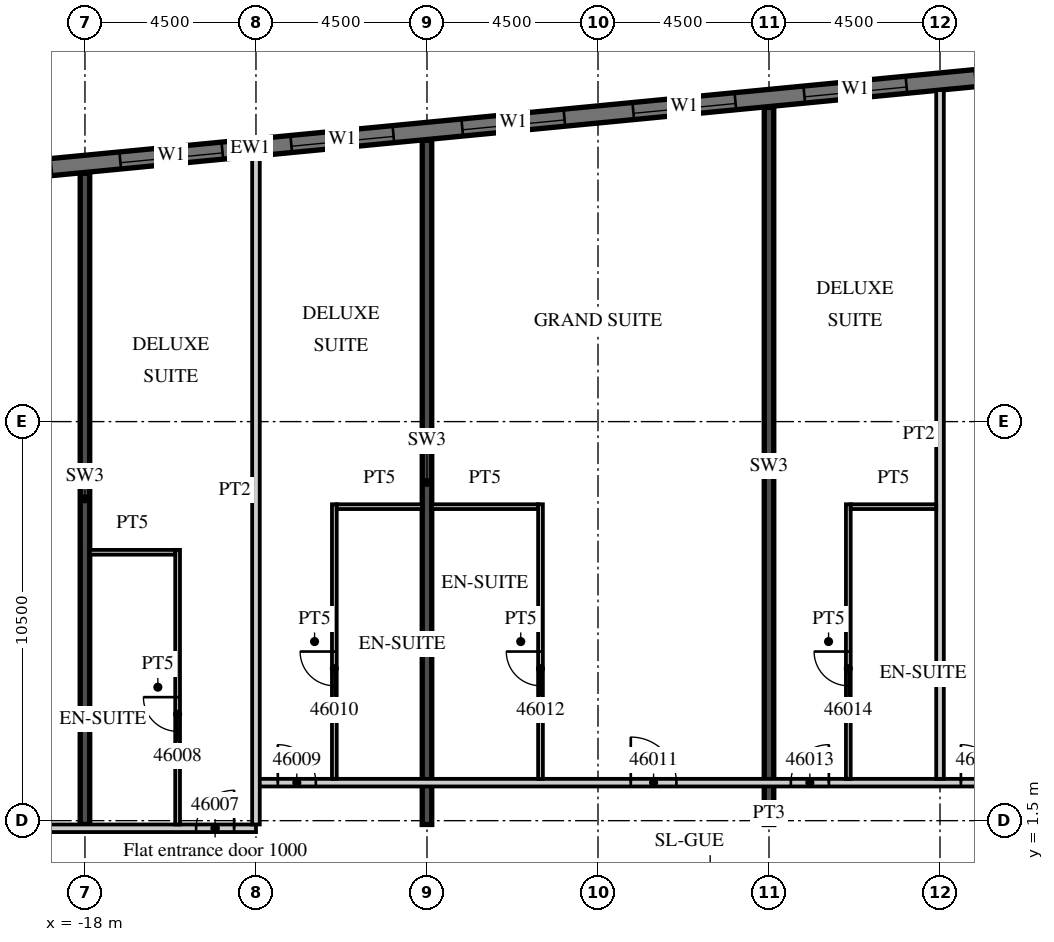
"""IFC4 building model, lengths in metres.
Left out: names, types, materials, properties, quantities, classifications, styles, units other than length and angle.
Written with IfcOpenShell. Run it as: python <this file> out.ifc"""

import sys

from ifc_helpers import new_model, si_unit, direction, frame, frame_2d, origin, place, context, subcontext, project, spatial, rectangle, extrude, element, fill, save


model = new_model("IFC4")
c1 = context("Model", 3, precision=1e-05, world=origin(), true_north=direction((0.0, 1.0)))
c2 = subcontext(c1, "Body", "Model", "MODEL_VIEW")
j1 = project(units=[si_unit("LENGTHUNIT", "METRE"), si_unit("PLANEANGLEUNIT", "RADIAN")], contexts=[c1])
p1 = place(None, origin())
s1 = spatial("IfcSite", under=j1, at=p1, CompositionType="ELEMENT")
p2 = place(p1, origin())
s2 = spatial("IfcBuilding", under=s1, at=p2, CompositionType="ELEMENT")
p3 = place(p2, frame((0.0, 0.0, 193.3)))
s3 = spatial("IfcBuildingStorey", under=s2, at=p3, CompositionType="ELEMENT", Elevation=193.3)
p4 = place(p3, frame((-18.0, 1.4, 0.0), z_axis=(0.0, 0.0, 1.0), x_axis=(0.0, 1.0, 0.0)))
e1 = element("IfcWall", 1, at=p4, inside=s3, PredefinedType="SHEAR", context=c2, shape_type="SweptSolid", body=[
    extrude(rectangle(XDim=17.134, YDim=0.25, at=frame_2d((8.567, 0.0))), origin(), (0.0, 0.0, 1.0), 3.3),
])
p5 = place(p3, frame((-9.0, 1.4, 0.0), z_axis=(0.0, 0.0, 1.0), x_axis=(0.0, 1.0, 0.0)))
e2 = element("IfcWall", 2, at=p5, inside=s3, PredefinedType="SHEAR", context=c2, shape_type="SweptSolid", body=[
    extrude(rectangle(XDim=18.001, YDim=0.25, at=frame_2d((9.0, 0.0))), origin(), (0.0, 0.0, 1.0), 3.3),
])
p6 = place(p3, frame((0.0, 1.4, 0.0), z_axis=(0.0, 0.0, 1.0), x_axis=(0.0, 1.0, 0.0)))
e3 = element("IfcWall", 3, at=p6, inside=s3, PredefinedType="SHEAR", context=c2, shape_type="SweptSolid", body=[
    extrude(rectangle(XDim=18.867, YDim=0.25, at=frame_2d((9.434, 0.0))), origin(), (0.0, 0.0, 1.0), 3.3),
])
p7 = place(p3, frame((13.521, 21.817, 0.0), z_axis=(0.0, 0.0, 1.0), x_axis=(-0.995396508751, -0.095842529008, 0.0)))
e4 = element("IfcWall", 4, at=p7, inside=s3, PredefinedType="SOLIDWALL", context=c2, shape_type="SweptSolid", body=[
    extrude(rectangle(XDim=54.591, YDim=0.45, at=frame_2d((27.296, 0.0))), origin(), (0.0, 0.0, 1.0), 3.02),
])
p8 = place(p7, frame((0.91, 0.0, 0.45)))
e5 = element("IfcOpeningElement", 5, at=p8, cuts=e4, PredefinedType="OPENING", context=c2, shape_type="SweptSolid", body=[
    extrude(rectangle(XDim=2.7, YDim=2.25, at=frame_2d((1.35, 1.125))), frame((0.0, 0.235, 0.0), z_axis=(0.0, -1.0, 0.0), x_axis=(1.0, 0.0, 0.0)), (0.0, 0.0, 1.0), 0.47),
])
p9 = place(p7, frame((5.431, 0.0, 0.45)))
e6 = element("IfcOpeningElement", 6, at=p9, cuts=e4, PredefinedType="OPENING", context=c2, shape_type="SweptSolid", body=[
    extrude(rectangle(XDim=2.7, YDim=2.25, at=frame_2d((1.35, 1.125))), frame((0.0, 0.235, 0.0), z_axis=(0.0, -1.0, 0.0), x_axis=(1.0, 0.0, 0.0)), (0.0, 0.0, 1.0), 0.47),
])
p10 = place(p7, frame((9.952, 0.0, 0.45)))
e7 = element("IfcOpeningElement", 7, at=p10, cuts=e4, PredefinedType="OPENING", context=c2, shape_type="SweptSolid", body=[
    extrude(rectangle(XDim=2.7, YDim=2.25, at=frame_2d((1.35, 1.125))), frame((0.0, 0.235, 0.0), z_axis=(0.0, -1.0, 0.0), x_axis=(1.0, 0.0, 0.0)), (0.0, 0.0, 1.0), 0.47),
])
p11 = place(p7, frame((14.473, 0.0, 0.45)))
e8 = element("IfcOpeningElement", 8, at=p11, cuts=e4, PredefinedType="OPENING", context=c2, shape_type="SweptSolid", body=[
    extrude(rectangle(XDim=2.7, YDim=2.25, at=frame_2d((1.35, 1.125))), frame((0.0, 0.235, 0.0), z_axis=(0.0, -1.0, 0.0), x_axis=(1.0, 0.0, 0.0)), (0.0, 0.0, 1.0), 0.47),
])
p12 = place(p7, frame((18.994, 0.0, 0.45)))
e9 = element("IfcOpeningElement", 9, at=p12, cuts=e4, PredefinedType="OPENING", context=c2, shape_type="SweptSolid", body=[
    extrude(rectangle(XDim=2.7, YDim=2.25, at=frame_2d((1.35, 1.125))), frame((0.0, 0.235, 0.0), z_axis=(0.0, -1.0, 0.0), x_axis=(1.0, 0.0, 0.0)), (0.0, 0.0, 1.0), 0.47),
])
p13 = place(p7, frame((23.514, 0.0, 0.45)))
e10 = element("IfcOpeningElement", 10, at=p13, cuts=e4, PredefinedType="OPENING", context=c2, shape_type="SweptSolid", body=[
    extrude(rectangle(XDim=2.7, YDim=2.25, at=frame_2d((1.35, 1.125))), frame((0.0, 0.235, 0.0), z_axis=(0.0, -1.0, 0.0), x_axis=(1.0, 0.0, 0.0)), (0.0, 0.0, 1.0), 0.47),
])
p14 = place(p7, frame((28.035, 0.0, 0.45)))
e11 = element("IfcOpeningElement", 11, at=p14, cuts=e4, PredefinedType="OPENING", context=c2, shape_type="SweptSolid", body=[
    extrude(rectangle(XDim=2.7, YDim=2.25, at=frame_2d((1.35, 1.125))), frame((0.0, 0.235, 0.0), z_axis=(0.0, -1.0, 0.0), x_axis=(1.0, 0.0, 0.0)), (0.0, 0.0, 1.0), 0.47),
])
p15 = place(p7, frame((32.556, 0.0, 0.45)))
e12 = element("IfcOpeningElement", 12, at=p15, cuts=e4, PredefinedType="OPENING", context=c2, shape_type="SweptSolid", body=[
    extrude(rectangle(XDim=2.7, YDim=2.25, at=frame_2d((1.35, 1.125))), frame((0.0, 0.235, 0.0), z_axis=(0.0, -1.0, 0.0), x_axis=(1.0, 0.0, 0.0)), (0.0, 0.0, 1.0), 0.47),
])
p16 = place(p7, frame((37.077, 0.0, 0.45)))
e13 = element("IfcOpeningElement", 13, at=p16, cuts=e4, PredefinedType="OPENING", context=c2, shape_type="SweptSolid", body=[
    extrude(rectangle(XDim=2.7, YDim=2.25, at=frame_2d((1.35, 1.125))), frame((0.0, 0.235, 0.0), z_axis=(0.0, -1.0, 0.0), x_axis=(1.0, 0.0, 0.0)), (0.0, 0.0, 1.0), 0.47),
])
p17 = place(p7, frame((41.598, 0.0, 0.45)))
e14 = element("IfcOpeningElement", 14, at=p17, cuts=e4, PredefinedType="OPENING", context=c2, shape_type="SweptSolid", body=[
    extrude(rectangle(XDim=2.7, YDim=2.25, at=frame_2d((1.35, 1.125))), frame((0.0, 0.235, 0.0), z_axis=(0.0, -1.0, 0.0), x_axis=(1.0, 0.0, 0.0)), (0.0, 0.0, 1.0), 0.47),
])
p18 = place(p7, frame((46.118, 0.0, 0.45)))
e15 = element("IfcOpeningElement", 15, at=p18, cuts=e4, PredefinedType="OPENING", context=c2, shape_type="SweptSolid", body=[
    extrude(rectangle(XDim=2.7, YDim=2.25, at=frame_2d((1.35, 1.125))), frame((0.0, 0.235, 0.0), z_axis=(0.0, -1.0, 0.0), x_axis=(1.0, 0.0, 0.0)), (0.0, 0.0, 1.0), 0.47),
])
p19 = place(p7, frame((50.629, 0.0, 0.45)))
e16 = element("IfcOpeningElement", 16, at=p19, cuts=e4, PredefinedType="OPENING", context=c2, shape_type="SweptSolid", body=[
    extrude(rectangle(XDim=2.7, YDim=2.25, at=frame_2d((1.35, 1.125))), frame((0.0, 0.235, 0.0), z_axis=(0.0, -1.0, 0.0), x_axis=(1.0, 0.0, 0.0)), (0.0, 0.0, 1.0), 0.47),
])
p20 = place(p3, frame((-42.913, 1.3, 0.0), z_axis=(0.0, 0.0, 1.0), x_axis=(1.0, 0.0, 0.0)))
e17 = element("IfcWall", 17, at=p20, inside=s3, PredefinedType="PARTITIONING", context=c2, shape_type="SweptSolid", body=[
    extrude(rectangle(XDim=29.413, YDim=0.2, at=frame_2d((14.707, 0.0))), origin(), (0.0, 0.0, 1.0), 3.02),
])
p21 = place(p20, frame((1.406, 0.0, 0.0)))
e18 = element("IfcOpeningElement", 18, at=p21, cuts=e17, PredefinedType="OPENING", context=c2, shape_type="SweptSolid", body=[
    extrude(rectangle(XDim=1.2, YDim=2.1, at=frame_2d((0.6, 1.05))), frame((0.0, 0.11, 0.0), z_axis=(0.0, -1.0, 0.0), x_axis=(1.0, 0.0, 0.0)), (0.0, 0.0, 1.0), 0.22),
])
p22 = place(p20, frame((12.275, 0.0, 0.0)))
e19 = element("IfcOpeningElement", 19, at=p22, cuts=e17, PredefinedType="OPENING", context=c2, shape_type="SweptSolid", body=[
    extrude(rectangle(XDim=1.2, YDim=2.1, at=frame_2d((0.6, 1.05))), frame((0.0, 0.11, 0.0), z_axis=(0.0, -1.0, 0.0), x_axis=(1.0, 0.0, 0.0)), (0.0, 0.0, 1.0), 0.22),
])
p23 = place(p20, frame((21.275, 0.0, 0.0)))
e20 = element("IfcOpeningElement", 20, at=p23, cuts=e17, PredefinedType="OPENING", context=c2, shape_type="SweptSolid", body=[
    extrude(rectangle(XDim=1.2, YDim=2.1, at=frame_2d((0.6, 1.05))), frame((0.0, 0.11, 0.0), z_axis=(0.0, -1.0, 0.0), x_axis=(1.0, 0.0, 0.0)), (0.0, 0.0, 1.0), 0.22),
])
p24 = place(p20, frame((27.838, 0.0, 0.0)))
e21 = element("IfcOpeningElement", 21, at=p24, cuts=e17, PredefinedType="OPENING", context=c2, shape_type="SweptSolid", body=[
    extrude(rectangle(XDim=1.0, YDim=2.1, at=frame_2d((0.5, 1.05))), frame((0.0, 0.11, 0.0), z_axis=(0.0, -1.0, 0.0), x_axis=(1.0, 0.0, 0.0)), (0.0, 0.0, 1.0), 0.22),
])
p25 = place(p3, frame((-13.5, 2.5, 0.0), z_axis=(0.0, 0.0, 1.0), x_axis=(1.0, 0.0, 0.0)))
e22 = element("IfcWall", 22, at=p25, inside=s3, PredefinedType="PARTITIONING", context=c2, shape_type="SweptSolid", body=[
    extrude(rectangle(XDim=27.0, YDim=0.2, at=frame_2d((13.5, 0.0))), origin(), (0.0, 0.0, 1.0), 3.02),
])
p26 = place(p25, frame((0.575, 0.0, 0.0)))
e23 = element("IfcOpeningElement", 23, at=p26, cuts=e22, PredefinedType="OPENING", context=c2, shape_type="SweptSolid", body=[
    extrude(rectangle(XDim=1.0, YDim=2.1, at=frame_2d((0.5, 1.05))), frame((0.0, 0.11, 0.0), z_axis=(0.0, -1.0, 0.0), x_axis=(1.0, 0.0, 0.0)), (0.0, 0.0, 1.0), 0.22),
])
p27 = place(p25, frame((9.863, 0.0, 0.0)))
e24 = element("IfcOpeningElement", 24, at=p27, cuts=e22, PredefinedType="OPENING", context=c2, shape_type="SweptSolid", body=[
    extrude(rectangle(XDim=1.2, YDim=2.1, at=frame_2d((0.6, 1.05))), frame((0.0, 0.11, 0.0), z_axis=(0.0, -1.0, 0.0), x_axis=(1.0, 0.0, 0.0)), (0.0, 0.0, 1.0), 0.22),
])
p28 = place(p25, frame((14.075, 0.0, 0.0)))
e25 = element("IfcOpeningElement", 25, at=p28, cuts=e22, PredefinedType="OPENING", context=c2, shape_type="SweptSolid", body=[
    extrude(rectangle(XDim=1.0, YDim=2.1, at=frame_2d((0.5, 1.05))), frame((0.0, 0.11, 0.0), z_axis=(0.0, -1.0, 0.0), x_axis=(1.0, 0.0, 0.0)), (0.0, 0.0, 1.0), 0.22),
])
p29 = place(p25, frame((18.55, 0.0, 0.0)))
e26 = element("IfcOpeningElement", 26, at=p29, cuts=e22, PredefinedType="OPENING", context=c2, shape_type="SweptSolid", body=[
    extrude(rectangle(XDim=1.0, YDim=2.1, at=frame_2d((0.5, 1.05))), frame((0.0, 0.11, 0.0), z_axis=(0.0, -1.0, 0.0), x_axis=(1.0, 0.0, 0.0)), (0.0, 0.0, 1.0), 0.22),
])
p30 = place(p25, frame((23.075, 0.0, 0.0)))
e27 = element("IfcOpeningElement", 27, at=p30, cuts=e22, PredefinedType="OPENING", context=c2, shape_type="SweptSolid", body=[
    extrude(rectangle(XDim=1.0, YDim=2.1, at=frame_2d((0.5, 1.05))), frame((0.0, 0.11, 0.0), z_axis=(0.0, -1.0, 0.0), x_axis=(1.0, 0.0, 0.0)), (0.0, 0.0, 1.0), 0.22),
])
p31 = place(p3, frame((-13.5, 1.4, 0.0), z_axis=(0.0, 0.0, 1.0), x_axis=(0.0, 1.0, 0.0)))
e28 = element("IfcWall", 28, at=p31, inside=s3, PredefinedType="PARTITIONING", context=c2, shape_type="SweptSolid", body=[
    extrude(rectangle(XDim=17.59, YDim=0.2, at=frame_2d((8.795, 0.0))), origin(), (0.0, 0.0, 1.0), 3.02),
])
p32 = place(p3, frame((-15.562, 1.4, 0.0), z_axis=(0.0, 0.0, 1.0), x_axis=(0.0, 1.0, 0.0)))
e29 = element("IfcWall", 29, at=p32, inside=s3, PredefinedType="PARTITIONING", context=c2, shape_type="SweptSolid", body=[
    extrude(rectangle(XDim=7.225, YDim=0.125, at=frame_2d((3.613, 0.0))), origin(), (0.0, 0.0, 1.0), 3.02),
])
p33 = place(p32, frame((2.45, 0.0, 0.0)))
e30 = element("IfcOpeningElement", 30, at=p33, cuts=e29, PredefinedType="OPENING", context=c2, shape_type="SweptSolid", body=[
    extrude(rectangle(XDim=0.9, YDim=2.1, at=frame_2d((0.45, 1.05))), frame((0.0, 0.073, 0.0), z_axis=(0.0, -1.0, 0.0), x_axis=(1.0, 0.0, 0.0)), (0.0, 0.0, 1.0), 0.145),
])
p34 = place(p3, frame((-17.875, 8.562, 0.0), z_axis=(0.0, 0.0, 1.0), x_axis=(1.0, 0.0, 0.0)))
e31 = element("IfcWall", 31, at=p34, inside=s3, PredefinedType="PARTITIONING", context=c2, shape_type="SweptSolid", body=[
    extrude(rectangle(XDim=2.25, YDim=0.125, at=frame_2d((1.125, 0.0))), origin(), (0.0, 0.0, 1.0), 3.02),
])
p35 = place(p3, frame((-11.438, 2.6, 0.0), z_axis=(0.0, 0.0, 1.0), x_axis=(0.0, 1.0, 0.0)))
e32 = element("IfcWall", 32, at=p35, inside=s3, PredefinedType="PARTITIONING", context=c2, shape_type="SweptSolid", body=[
    extrude(rectangle(XDim=7.225, YDim=0.125, at=frame_2d((3.612, 0.0))), origin(), (0.0, 0.0, 1.0), 3.02),
])
p36 = place(p35, frame((2.45, 0.0, 0.0)))
e33 = element("IfcOpeningElement", 33, at=p36, cuts=e32, PredefinedType="OPENING", context=c2, shape_type="SweptSolid", body=[
    extrude(rectangle(XDim=0.9, YDim=2.1, at=frame_2d((0.45, 1.05))), frame((0.0, 0.073, 0.0), z_axis=(0.0, -1.0, 0.0), x_axis=(1.0, 0.0, 0.0)), (0.0, 0.0, 1.0), 0.145),
])
p37 = place(p3, frame((-11.375, 9.762, 0.0), z_axis=(0.0, 0.0, 1.0), x_axis=(1.0, 0.0, 0.0)))
e34 = element("IfcWall", 34, at=p37, inside=s3, PredefinedType="PARTITIONING", context=c2, shape_type="SweptSolid", body=[
    extrude(rectangle(XDim=2.25, YDim=0.125, at=frame_2d((1.125, 0.0))), origin(), (0.0, 0.0, 1.0), 3.02),
])
p38 = place(p3, frame((-6.013, 2.6, 0.0), z_axis=(0.0, 0.0, 1.0), x_axis=(0.0, 1.0, 0.0)))
e35 = element("IfcWall", 35, at=p38, inside=s3, PredefinedType="PARTITIONING", context=c2, shape_type="SweptSolid", body=[
    extrude(rectangle(XDim=7.225, YDim=0.125, at=frame_2d((3.612, 0.0))), origin(), (0.0, 0.0, 1.0), 3.02),
])
p39 = place(p38, frame((2.45, 0.0, 0.0)))
e36 = element("IfcOpeningElement", 36, at=p39, cuts=e35, PredefinedType="OPENING", context=c2, shape_type="SweptSolid", body=[
    extrude(rectangle(XDim=0.9, YDim=2.1, at=frame_2d((0.45, 1.05))), frame((0.0, 0.073, 0.0), z_axis=(0.0, -1.0, 0.0), x_axis=(1.0, 0.0, 0.0)), (0.0, 0.0, 1.0), 0.145),
])
p40 = place(p3, frame((-8.875, 9.762, 0.0), z_axis=(0.0, 0.0, 1.0), x_axis=(1.0, 0.0, 0.0)))
e37 = element("IfcWall", 37, at=p40, inside=s3, PredefinedType="PARTITIONING", context=c2, shape_type="SweptSolid", body=[
    extrude(rectangle(XDim=2.8, YDim=0.125, at=frame_2d((1.4, 0.0))), origin(), (0.0, 0.0, 1.0), 3.02),
])
p41 = place(p3, frame((4.5, 2.6, 0.0), z_axis=(0.0, 0.0, 1.0), x_axis=(0.0, 1.0, 0.0)))
e38 = element("IfcWall", 38, at=p41, inside=s3, PredefinedType="PARTITIONING", context=c2, shape_type="SweptSolid", body=[
    extrude(rectangle(XDim=18.123, YDim=0.2, at=frame_2d((9.062, 0.0))), origin(), (0.0, 0.0, 1.0), 3.02),
])
p42 = place(p3, frame((2.087, 2.6, 0.0), z_axis=(0.0, 0.0, 1.0), x_axis=(0.0, 1.0, 0.0)))
e39 = element("IfcWall", 39, at=p42, inside=s3, PredefinedType="PARTITIONING", context=c2, shape_type="SweptSolid", body=[
    extrude(rectangle(XDim=7.225, YDim=0.125, at=frame_2d((3.612, 0.0))), origin(), (0.0, 0.0, 1.0), 3.02),
])
p43 = place(p42, frame((2.45, 0.0, 0.0)))
e40 = element("IfcOpeningElement", 40, at=p43, cuts=e39, PredefinedType="OPENING", context=c2, shape_type="SweptSolid", body=[
    extrude(rectangle(XDim=0.9, YDim=2.1, at=frame_2d((0.45, 1.05))), frame((0.0, 0.073, 0.0), z_axis=(0.0, -1.0, 0.0), x_axis=(1.0, 0.0, 0.0)), (0.0, 0.0, 1.0), 0.145),
])
p44 = place(p3, frame((2.15, 9.762, 0.0), z_axis=(0.0, 0.0, 1.0), x_axis=(1.0, 0.0, 0.0)))
e41 = element("IfcWall", 41, at=p44, inside=s3, PredefinedType="PARTITIONING", context=c2, shape_type="SweptSolid", body=[
    extrude(rectangle(XDim=2.25, YDim=0.125, at=frame_2d((1.125, 0.0))), origin(), (0.0, 0.0, 1.0), 3.02),
])
p45 = place(p10, origin())
e42 = element("IfcWindow", 42, at=p45, inside=s3, PartitioningType="SINGLE_PANEL", PredefinedType="WINDOW", context=c2, shape_type="SweptSolid", body=[
    extrude(rectangle(XDim=2.7, YDim=2.25, at=frame_2d((1.35, 1.125))), frame((0.0, 0.09, 0.0), z_axis=(0.0, -1.0, 0.0), x_axis=(1.0, 0.0, 0.0)), (0.0, 0.0, 1.0), 0.06),
])
fill(e7, e42)
p46 = place(p11, origin())
e43 = element("IfcWindow", 43, at=p46, inside=s3, PartitioningType="SINGLE_PANEL", PredefinedType="WINDOW", context=c2, shape_type="SweptSolid", body=[
    extrude(rectangle(XDim=2.7, YDim=2.25, at=frame_2d((1.35, 1.125))), frame((0.0, 0.09, 0.0), z_axis=(0.0, -1.0, 0.0), x_axis=(1.0, 0.0, 0.0)), (0.0, 0.0, 1.0), 0.06),
])
fill(e8, e43)
p47 = place(p12, origin())
e44 = element("IfcWindow", 44, at=p47, inside=s3, PartitioningType="SINGLE_PANEL", PredefinedType="WINDOW", context=c2, shape_type="SweptSolid", body=[
    extrude(rectangle(XDim=2.7, YDim=2.25, at=frame_2d((1.35, 1.125))), frame((0.0, 0.09, 0.0), z_axis=(0.0, -1.0, 0.0), x_axis=(1.0, 0.0, 0.0)), (0.0, 0.0, 1.0), 0.06),
])
fill(e9, e44)
p48 = place(p13, origin())
e45 = element("IfcWindow", 45, at=p48, inside=s3, PartitioningType="SINGLE_PANEL", PredefinedType="WINDOW", context=c2, shape_type="SweptSolid", body=[
    extrude(rectangle(XDim=2.7, YDim=2.25, at=frame_2d((1.35, 1.125))), frame((0.0, 0.09, 0.0), z_axis=(0.0, -1.0, 0.0), x_axis=(1.0, 0.0, 0.0)), (0.0, 0.0, 1.0), 0.06),
])
fill(e10, e45)
p49 = place(p14, origin())
e46 = element("IfcWindow", 46, at=p49, inside=s3, PartitioningType="SINGLE_PANEL", PredefinedType="WINDOW", context=c2, shape_type="SweptSolid", body=[
    extrude(rectangle(XDim=2.7, YDim=2.25, at=frame_2d((1.35, 1.125))), frame((0.0, 0.09, 0.0), z_axis=(0.0, -1.0, 0.0), x_axis=(1.0, 0.0, 0.0)), (0.0, 0.0, 1.0), 0.06),
])
fill(e11, e46)
p50 = place(p24, origin())
e47 = element("IfcDoor", 47, at=p50, inside=s3, OperationType="SINGLE_SWING_RIGHT", PredefinedType="DOOR", context=c2, shape_type="SweptSolid", body=[
    extrude(rectangle(XDim=1.0, YDim=2.1, at=frame_2d((0.5, 1.05))), frame((0.0, 0.025, 0.0), z_axis=(0.0, -1.0, 0.0), x_axis=(1.0, 0.0, 0.0)), (0.0, 0.0, 1.0), 0.05),
])
fill(e21, e47)
p51 = place(p33, origin())
e48 = element("IfcDoor", 48, at=p51, inside=s3, OperationType="SINGLE_SWING_RIGHT", PredefinedType="DOOR", context=c2, shape_type="SweptSolid", body=[
    extrude(rectangle(XDim=0.9, YDim=2.1, at=frame_2d((0.45, 1.05))), frame((0.0, 0.025, 0.0), z_axis=(0.0, -1.0, 0.0), x_axis=(1.0, 0.0, 0.0)), (0.0, 0.0, 1.0), 0.05),
])
fill(e30, e48)
p52 = place(p26, origin())
e49 = element("IfcDoor", 49, at=p52, inside=s3, OperationType="SINGLE_SWING_LEFT", PredefinedType="DOOR", context=c2, shape_type="SweptSolid", body=[
    extrude(rectangle(XDim=1.0, YDim=2.1, at=frame_2d((0.5, 1.05))), frame((0.0, 0.025, 0.0), z_axis=(0.0, -1.0, 0.0), x_axis=(1.0, 0.0, 0.0)), (0.0, 0.0, 1.0), 0.05),
])
fill(e23, e49)
p53 = place(p36, origin())
e50 = element("IfcDoor", 50, at=p53, inside=s3, OperationType="SINGLE_SWING_RIGHT", PredefinedType="DOOR", context=c2, shape_type="SweptSolid", body=[
    extrude(rectangle(XDim=0.9, YDim=2.1, at=frame_2d((0.45, 1.05))), frame((0.0, 0.025, 0.0), z_axis=(0.0, -1.0, 0.0), x_axis=(1.0, 0.0, 0.0)), (0.0, 0.0, 1.0), 0.05),
])
fill(e33, e50)
p54 = place(p27, origin())
e51 = element("IfcDoor", 51, at=p54, inside=s3, OperationType="SINGLE_SWING_LEFT", PredefinedType="DOOR", context=c2, shape_type="SweptSolid", body=[
    extrude(rectangle(XDim=1.2, YDim=2.1, at=frame_2d((0.6, 1.05))), frame((0.0, 0.025, 0.0), z_axis=(0.0, -1.0, 0.0), x_axis=(1.0, 0.0, 0.0)), (0.0, 0.0, 1.0), 0.05),
])
fill(e24, e51)
p55 = place(p39, origin())
e52 = element("IfcDoor", 52, at=p55, inside=s3, OperationType="SINGLE_SWING_RIGHT", PredefinedType="DOOR", context=c2, shape_type="SweptSolid", body=[
    extrude(rectangle(XDim=0.9, YDim=2.1, at=frame_2d((0.45, 1.05))), frame((0.0, 0.025, 0.0), z_axis=(0.0, -1.0, 0.0), x_axis=(1.0, 0.0, 0.0)), (0.0, 0.0, 1.0), 0.05),
])
fill(e36, e52)
p56 = place(p28, origin())
e53 = element("IfcDoor", 53, at=p56, inside=s3, OperationType="SINGLE_SWING_RIGHT", PredefinedType="DOOR", context=c2, shape_type="SweptSolid", body=[
    extrude(rectangle(XDim=1.0, YDim=2.1, at=frame_2d((0.5, 1.05))), frame((0.0, 0.025, 0.0), z_axis=(0.0, -1.0, 0.0), x_axis=(1.0, 0.0, 0.0)), (0.0, 0.0, 1.0), 0.05),
])
fill(e25, e53)
p57 = place(p43, origin())
e54 = element("IfcDoor", 54, at=p57, inside=s3, OperationType="SINGLE_SWING_RIGHT", PredefinedType="DOOR", context=c2, shape_type="SweptSolid", body=[
    extrude(rectangle(XDim=0.9, YDim=2.1, at=frame_2d((0.45, 1.05))), frame((0.0, 0.025, 0.0), z_axis=(0.0, -1.0, 0.0), x_axis=(1.0, 0.0, 0.0)), (0.0, 0.0, 1.0), 0.05),
])
fill(e40, e54)
p58 = place(p29, origin())
e55 = element("IfcDoor", 55, at=p58, inside=s3, OperationType="SINGLE_SWING_LEFT", PredefinedType="DOOR", context=c2, shape_type="SweptSolid", body=[
    extrude(rectangle(XDim=1.0, YDim=2.1, at=frame_2d((0.5, 1.05))), frame((0.0, 0.025, 0.0), z_axis=(0.0, -1.0, 0.0), x_axis=(1.0, 0.0, 0.0)), (0.0, 0.0, 1.0), 0.05),
])
fill(e26, e55)
save(model, sys.argv[1])
